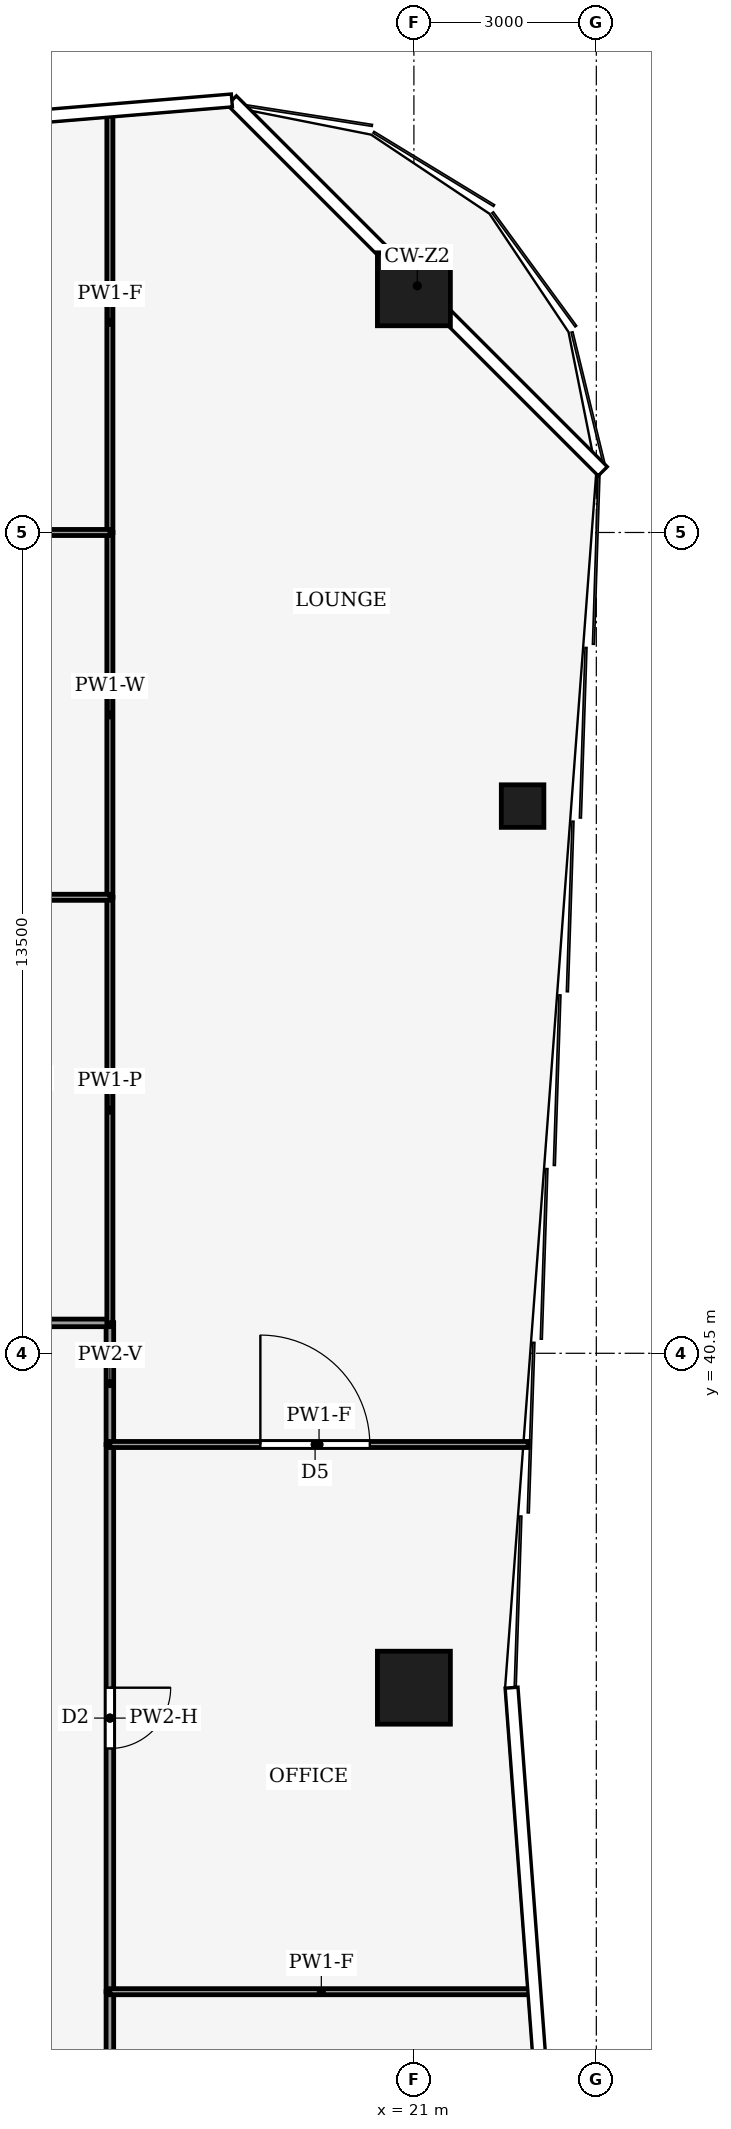
"""IFC4 building model, lengths in metres.
Left out: names, types, materials, properties, quantities, classifications, styles, units other than length and angle.
Written with IfcOpenShell. Run it as: python <this file> out.ifc"""

import sys

from ifc_helpers import new_model, si_unit, direction, frame, frame_2d, origin, origin_2d, place, context, subcontext, project, spatial, rectangle, hollow_rectangle, extrude, element, fill, save


model = new_model("IFC4")
c1 = context("Model", 3, precision=1e-05, world=origin(), true_north=direction((0.0, 1.0)))
c2 = subcontext(c1, "Body", "Model", "MODEL_VIEW")
j1 = project(units=[si_unit("LENGTHUNIT", "METRE"), si_unit("PLANEANGLEUNIT", "RADIAN")], contexts=[c1])
p1 = place(None, origin())
s1 = spatial("IfcSite", under=j1, at=p1, CompositionType="ELEMENT")
p2 = place(p1, origin())
s2 = spatial("IfcBuilding", under=s1, at=p2, CompositionType="ELEMENT")
p3 = place(p2, frame((0.0, 0.0, 158.0)))
s3 = spatial("IfcBuildingStorey", under=s2, at=p3, CompositionType="ELEMENT", Elevation=158.0)
for number, where, z_axis, x_axis in (
    (1, (21.0, 58.0, 0.0), (0.0, 0.0, 1.0), (1.0, 0.0, 0.0)),
    (2, (21.0, 35.0, 0.0), (0.0, 0.0, 1.0), (1.0, 0.0, 0.0)),
):
    element("IfcColumn", number, at=place(p3, frame(where, z_axis=z_axis, x_axis=x_axis)), inside=s3, PredefinedType="COLUMN", context=c2, shape_type="SweptSolid", body=[
        extrude(hollow_rectangle(XDim=1.2, YDim=1.2, WallThickness=0.07, at=origin_2d()), origin(), (0.0, 0.0, 1.0), 4.0),
    ])
p4 = place(p3, frame((22.788, 49.5, 0.0), z_axis=(0.0, 0.0, 1.0), x_axis=(1.0, 0.0, 0.0)))
e3 = element("IfcColumn", 3, at=p4, inside=s3, PredefinedType="COLUMN", context=c2, shape_type="SweptSolid", body=[
    extrude(hollow_rectangle(XDim=0.7, YDim=0.7, WallThickness=0.03, at=origin_2d()), origin(), (0.0, 0.0, 1.0), 4.0),
])
p5 = place(p3, frame((16.0, 30.0, 0.0), z_axis=(0.0, 0.0, 1.0), x_axis=(0.0, -1.0, 0.0)))
e4 = element("IfcWall", 4, at=p5, inside=s3, PredefinedType="PARTITIONING", context=c2, shape_type="SweptSolid", body=[
    extrude(rectangle(XDim=3.0, YDim=0.125, at=frame_2d((1.5, 0.0))), origin(), (0.0, 0.0, 1.0), 3.48),
])
p6 = place(p5, frame((1.05, 0.0, 0.0)))
e5 = element("IfcOpeningElement", 5, at=p6, cuts=e4, PredefinedType="OPENING", context=c2, shape_type="SweptSolid", body=[
    extrude(rectangle(XDim=0.9, YDim=2.1, at=frame_2d((0.45, 1.05))), frame((0.0, 0.073, 0.0), z_axis=(0.0, -1.0, 0.0), x_axis=(1.0, 0.0, 0.0)), (0.0, 0.0, 1.0), 0.145),
])
p7 = place(p3, frame((16.0, 39.0, 0.0), z_axis=(0.0, 0.0, 1.0), x_axis=(0.0, -1.0, 0.0)))
e6 = element("IfcWall", 6, at=p7, inside=s3, PredefinedType="PARTITIONING", context=c2, shape_type="SweptSolid", body=[
    extrude(rectangle(XDim=9.0, YDim=0.125, at=frame_2d((4.5, 0.0))), origin(), (0.0, 0.0, 1.0), 3.14),
])
p8 = place(p7, frame((4.0, 0.0, 0.0)))
e7 = element("IfcOpeningElement", 7, at=p8, cuts=e6, PredefinedType="OPENING", context=c2, shape_type="SweptSolid", body=[
    extrude(rectangle(XDim=1.0, YDim=2.1, at=frame_2d((0.5, 1.05))), frame((0.0, 0.073, 0.0), z_axis=(0.0, -1.0, 0.0), x_axis=(1.0, 0.0, 0.0)), (0.0, 0.0, 1.0), 0.145),
])
p9 = place(p3, frame((16.0, 39.0, 0.0), z_axis=(0.0, 0.0, 1.0), x_axis=(0.0, 1.0, 0.0)))
e8 = element("IfcWall", 8, at=p9, inside=s3, PredefinedType="PARTITIONING", context=c2, shape_type="SweptSolid", body=[
    extrude(rectangle(XDim=2.004, YDim=0.125, at=frame_2d((1.002, 0.0))), origin(), (0.0, 0.0, 1.0), 3.44),
])
p10 = place(p3, frame((16.0, 41.0, 0.0), z_axis=(0.0, 0.0, 1.0), x_axis=(-1.0, 0.0, 0.0)))
e9 = element("IfcWall", 9, at=p10, inside=s3, PredefinedType="PARTITIONING", context=c2, shape_type="SweptSolid", body=[
    extrude(rectangle(XDim=4.0, YDim=0.125, at=frame_2d((2.0, 0.0))), origin(), (0.0, 0.0, 1.0), 3.44),
])
p11 = place(p3, frame((22.955, 30.0, 0.0), z_axis=(0.0, 0.0, 1.0), x_axis=(-1.0, 0.0, 0.0)))
e10 = element("IfcWall", 10, at=p11, inside=s3, PredefinedType="PARTITIONING", context=c2, shape_type="SweptSolid", body=[
    extrude(rectangle(XDim=6.955, YDim=0.1, at=frame_2d((3.478, 0.0))), origin(), (0.0, 0.0, 1.0), 3.04),
])
p12 = place(p3, frame((16.0, 39.0, 0.0), z_axis=(0.0, 0.0, 1.0), x_axis=(1.0, 0.0, 0.0)))
e11 = element("IfcWall", 11, at=p12, inside=s3, PredefinedType="PARTITIONING", context=c2, shape_type="SweptSolid", body=[
    extrude(rectangle(XDim=6.88, YDim=0.1, at=frame_2d((3.44, 0.0))), origin(), (0.0, 0.0, 1.0), 3.04),
])
p13 = place(p12, frame((2.475, 0.0, 0.0)))
e12 = element("IfcOpeningElement", 12, at=p13, cuts=e11, PredefinedType="OPENING", context=c2, shape_type="SweptSolid", body=[
    extrude(rectangle(XDim=1.8, YDim=2.1, at=frame_2d((0.9, 1.05))), frame((0.0, 0.06, 0.0), z_axis=(0.0, -1.0, 0.0), x_axis=(1.0, 0.0, 0.0)), (0.0, 0.0, 1.0), 0.12),
])
p14 = place(p3, frame((16.0, 48.0, 0.0), z_axis=(0.0, 0.0, 1.0), x_axis=(0.0, -1.0, 0.0)))
e13 = element("IfcWall", 13, at=p14, inside=s3, PredefinedType="PARTITIONING", context=c2, shape_type="SweptSolid", body=[
    extrude(rectangle(XDim=7.0, YDim=0.1, at=frame_2d((3.5, 0.0))), origin(), (0.0, 0.0, 1.0), 3.44),
])
p15 = place(p3, frame((16.0, 54.0, 0.0), z_axis=(0.0, 0.0, 1.0), x_axis=(0.0, -1.0, 0.0)))
e14 = element("IfcWall", 14, at=p15, inside=s3, PredefinedType="PARTITIONING", context=c2, shape_type="SweptSolid", body=[
    extrude(rectangle(XDim=6.0, YDim=0.1, at=frame_2d((3.0, 0.0))), origin(), (0.0, 0.0, 1.0), 3.24),
])
p16 = place(p3, frame((16.0, 60.913, 0.0), z_axis=(0.0, 0.0, 1.0), x_axis=(0.0, -1.0, 0.0)))
e15 = element("IfcWall", 15, at=p16, inside=s3, PredefinedType="PARTITIONING", context=c2, shape_type="SweptSolid", body=[
    extrude(rectangle(XDim=6.913, YDim=0.1, at=frame_2d((3.457, 0.0))), origin(), (0.0, 0.0, 1.0), 3.04),
])
p17 = place(p3, frame((16.0, 48.0, 0.0), z_axis=(0.0, 0.0, 1.0), x_axis=(-1.0, 0.0, 0.0)))
e16 = element("IfcWall", 16, at=p17, inside=s3, PredefinedType="PARTITIONING", context=c2, shape_type="SweptSolid", body=[
    extrude(rectangle(XDim=4.004, YDim=0.1, at=frame_2d((2.002, 0.0))), origin(), (0.0, 0.0, 1.0), 3.87),
])
p18 = place(p3, frame((6.0, 54.0, 0.0), z_axis=(0.0, 0.0, 1.0), x_axis=(1.0, 0.0, 0.0)))
e17 = element("IfcWall", 17, at=p18, inside=s3, PredefinedType="PARTITIONING", context=c2, shape_type="SweptSolid", body=[
    extrude(rectangle(XDim=10.0, YDim=0.1, at=frame_2d((5.0, 0.0))), origin(), (0.0, 0.0, 1.0), 3.44),
])
p19 = place(p18, frame((4.5, 0.0, 0.0)))
e18 = element("IfcOpeningElement", 18, at=p19, cuts=e17, PredefinedType="OPENING", context=c2, shape_type="SweptSolid", body=[
    extrude(rectangle(XDim=1.0, YDim=2.1, at=frame_2d((0.5, 1.05))), frame((0.0, 0.06, 0.0), z_axis=(0.0, -1.0, 0.0), x_axis=(1.0, 0.0, 0.0)), (0.0, 0.0, 1.0), 0.12),
])
p20 = place(p8, origin())
e19 = element("IfcDoor", 19, at=p20, inside=s3, OperationType="SINGLE_SWING_RIGHT", PredefinedType="DOOR", context=c2, shape_type="SweptSolid", body=[
    extrude(rectangle(XDim=1.0, YDim=2.1, at=frame_2d((0.5, 1.05))), frame((0.0, 0.025, 0.0), z_axis=(0.0, -1.0, 0.0), x_axis=(1.0, 0.0, 0.0)), (0.0, 0.0, 1.0), 0.05),
])
fill(e7, e19)
p21 = place(p13, origin())
e20 = element("IfcDoor", 20, at=p21, inside=s3, OperationType="DOUBLE_DOOR_SINGLE_SWING", PredefinedType="DOOR", context=c2, shape_type="SweptSolid", body=[
    extrude(rectangle(XDim=1.8, YDim=2.1, at=frame_2d((0.9, 1.05))), frame((0.0, 0.025, 0.0), z_axis=(0.0, -1.0, 0.0), x_axis=(1.0, 0.0, 0.0)), (0.0, 0.0, 1.0), 0.05),
])
fill(e12, e20)
save(model, sys.argv[1])
